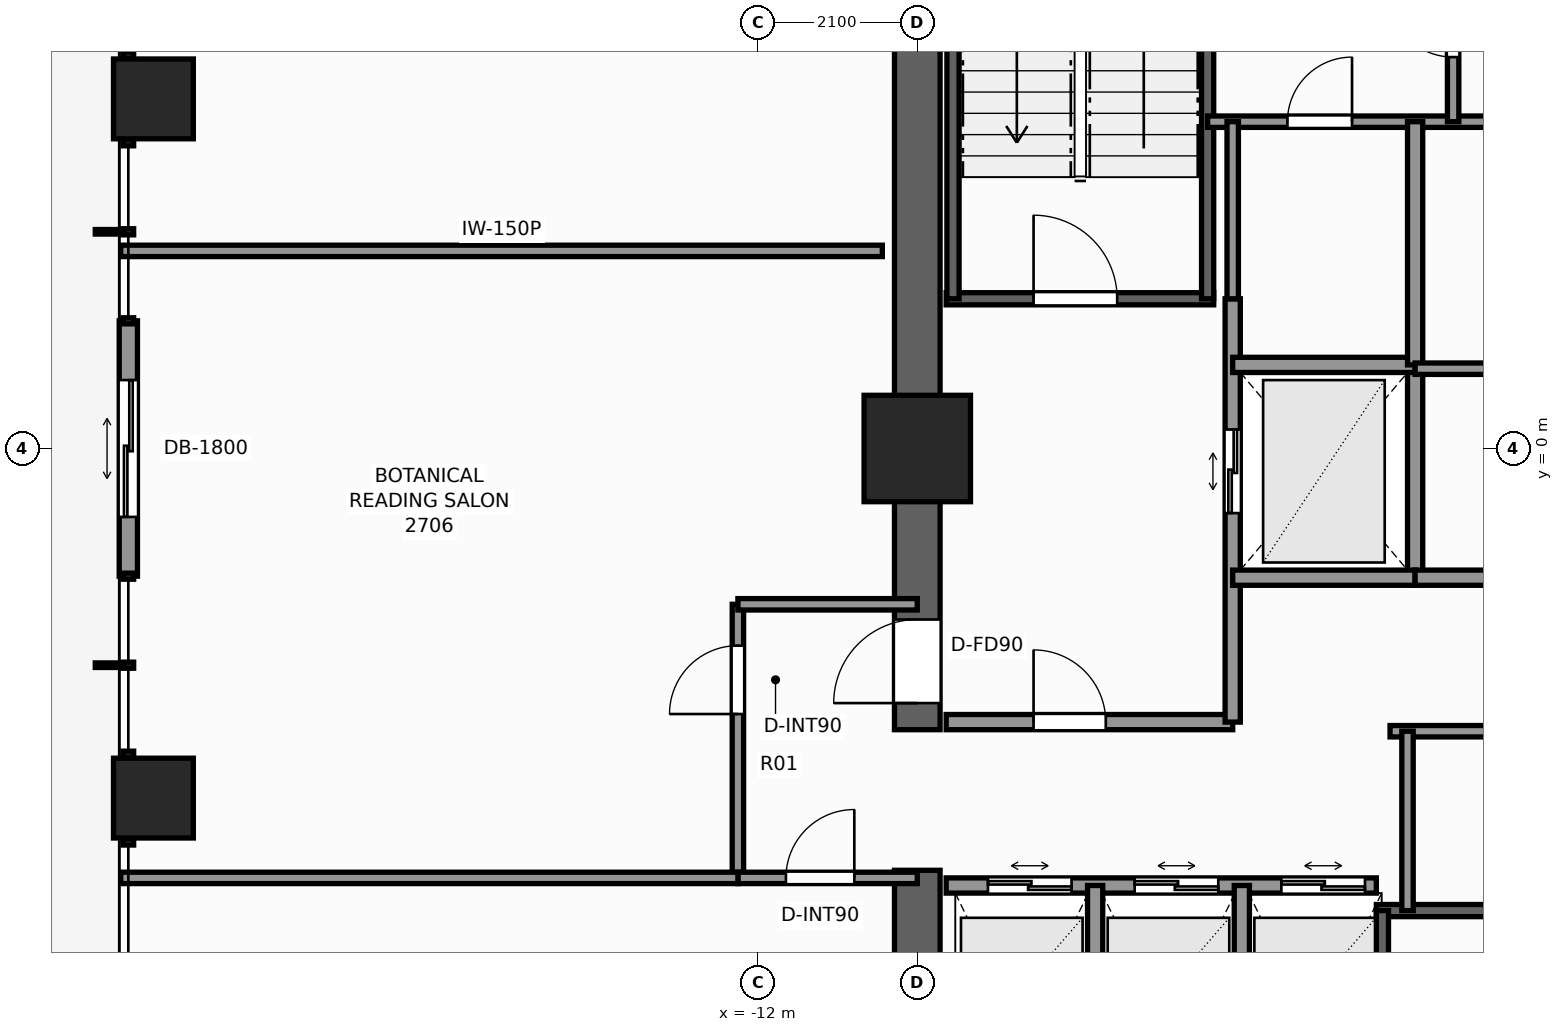
"""IFC4 building model, lengths in metres.
Left out: names, types, materials, properties, quantities, classifications, styles, units other than length and angle.
Written with IfcOpenShell. Run it as: python <this file> out.ifc"""

import sys

from ifc_helpers import new_model, si_unit, direction, frame, frame_2d, origin, origin_2d, place, context, subcontext, project, spatial, rectangle, extrude, element, fill, save


model = new_model("IFC4")
c1 = context("Model", 3, precision=1e-05, world=origin(), true_north=direction((0.0, 1.0)))
c2 = subcontext(c1, "Body", "Model", "MODEL_VIEW")
j1 = project(units=[si_unit("LENGTHUNIT", "METRE"), si_unit("PLANEANGLEUNIT", "RADIAN")], contexts=[c1])
p1 = place(None, origin())
s1 = spatial("IfcSite", under=j1, at=p1, CompositionType="ELEMENT")
p2 = place(p1, origin())
s2 = spatial("IfcBuilding", under=s1, at=p2, CompositionType="ELEMENT")
p3 = place(p2, frame((0.0, 0.0, 95.3)))
s3 = spatial("IfcBuildingStorey", under=s2, at=p3, CompositionType="ELEMENT", Elevation=95.3)
p4 = place(p3, frame((-9.9, -9.6, 0.0), z_axis=(0.0, 0.0, 1.0), x_axis=(0.0, 1.0, 0.0)))
e1 = element("IfcWall", 1, at=p4, inside=s3, PredefinedType="SHEAR", context=c2, shape_type="SweptSolid", body=[
    extrude(rectangle(XDim=4.05, YDim=0.6, at=frame_2d((2.025, 0.0))), origin(), (0.0, 0.0, 1.0), 3.3),
])
p5 = place(p3, frame((-9.9, -3.7, 0.0), z_axis=(0.0, 0.0, 1.0), x_axis=(0.0, 1.0, 0.0)))
e2 = element("IfcWall", 2, at=p5, inside=s3, PredefinedType="SHEAR", context=c2, shape_type="SweptSolid", body=[
    extrude(rectangle(XDim=13.3, YDim=0.6, at=frame_2d((6.65, 0.0))), origin(), (0.0, 0.0, 1.0), 3.3),
])
p6 = place(p5, frame((0.35, 0.0, 0.0)))
e3 = element("IfcOpeningElement", 3, at=p6, cuts=e2, PredefinedType="OPENING", context=c2, shape_type="SweptSolid", body=[
    extrude(rectangle(XDim=1.1, YDim=2.2, at=frame_2d((0.55, 1.1))), frame((0.0, 0.31, 0.0), z_axis=(0.0, -1.0, 0.0), x_axis=(1.0, 0.0, 0.0)), (0.0, 0.0, 1.0), 0.62),
])
p7 = place(p3, frame((-9.9, 0.0, 0.0), z_axis=(0.0, 0.0, 1.0), x_axis=(1.0, 0.0, 0.0)))
e4 = element("IfcColumn", 4, at=p7, inside=s3, PredefinedType="COLUMN", context=c2, shape_type="SweptSolid", body=[
    extrude(rectangle(XDim=1.4, YDim=1.4, at=origin_2d()), origin(), (0.0, 0.0, 1.0), 3.3),
])
for number, where, z_axis, x_axis in (
    (5, (-19.95, -4.6, 0.0), (0.0, 0.0, 1.0), (1.0, 0.0, 0.0)),
    (6, (-19.95, 4.6, 0.0), (0.0, 0.0, 1.0), (1.0, 0.0, 0.0)),
):
    element("IfcColumn", number, at=place(p3, frame(where, z_axis=z_axis, x_axis=x_axis)), inside=s3, PredefinedType="COLUMN", context=c2, shape_type="SweptSolid", body=[
        extrude(rectangle(XDim=1.05, YDim=1.05, at=origin_2d()), origin(), (0.0, 0.0, 1.0), 3.3),
    ])
p8 = place(p3, frame((-20.28, -1.68, 0.0), z_axis=(0.0, 0.0, 1.0), x_axis=(0.0, 1.0, 0.0)))
e7 = element("IfcWall", 7, at=p8, inside=s3, PredefinedType="STANDARD", context=c2, shape_type="SweptSolid", body=[
    extrude(rectangle(XDim=3.36, YDim=0.24, at=frame_2d((1.68, 0.0))), origin(), (0.0, 0.0, 1.0), 3.08),
])
p9 = place(p8, frame((0.78, 0.0, 0.0)))
e8 = element("IfcOpeningElement", 8, at=p9, cuts=e7, PredefinedType="OPENING", context=c2, shape_type="SweptSolid", body=[
    extrude(rectangle(XDim=1.8, YDim=2.2, at=frame_2d((0.9, 1.1))), frame((0.0, 0.13, 0.0), z_axis=(0.0, -1.0, 0.0), x_axis=(1.0, 0.0, 0.0)), (0.0, 0.0, 1.0), 0.26),
])
p10 = place(p3, frame((-9.52, 1.97, 0.0), z_axis=(0.0, 0.0, 1.0), x_axis=(1.0, 0.0, 0.0)))
e9 = element("IfcWall", 9, at=p10, inside=s3, PredefinedType="SHEAR", context=c2, shape_type="SweptSolid", body=[
    extrude(rectangle(XDim=3.52, YDim=0.16, at=frame_2d((1.76, 0.0))), origin(), (0.0, 0.0, 1.0), 3.3),
])
p11 = place(p10, frame((1.15, 0.0, 0.0)))
e10 = element("IfcOpeningElement", 10, at=p11, cuts=e9, PredefinedType="OPENING", context=c2, shape_type="SweptSolid", body=[
    extrude(rectangle(XDim=1.1, YDim=2.2, at=frame_2d((0.55, 1.1))), frame((0.0, 0.09, 0.0), z_axis=(0.0, -1.0, 0.0), x_axis=(1.0, 0.0, 0.0)), (0.0, 0.0, 1.0), 0.18),
])
for number, where, z_axis, x_axis in (
    (11, (-9.43, 1.97, 0.0), (0.0, 0.0, 1.0), (0.0, 1.0, 0.0)),
    (12, (-6.08, 1.97, 0.0), (0.0, 0.0, 1.0), (0.0, 1.0, 0.0)),
):
    element("IfcWall", number, at=place(p3, frame(where, z_axis=z_axis, x_axis=x_axis)), inside=s3, PredefinedType="SHEAR", context=c2, shape_type="SweptSolid", body=[
        extrude(rectangle(XDim=7.56, YDim=0.16, at=frame_2d((3.78, 0.0))), origin(), (0.0, 0.0, 1.0), 3.3),
    ])
p12 = place(p3, frame((-3.86, -6.08, 0.0), z_axis=(0.0, 0.0, 1.0), x_axis=(1.0, 0.0, 0.0)))
e13 = element("IfcWall", 13, at=p12, inside=s3, PredefinedType="SHEAR", context=c2, shape_type="SweptSolid", body=[
    extrude(rectangle(XDim=7.72, YDim=0.16, at=frame_2d((3.86, 0.0))), origin(), (0.0, 0.0, 1.0), 3.3),
])
p13 = place(p3, frame((-3.78, -9.43, 0.0), z_axis=(0.0, 0.0, 1.0), x_axis=(0.0, 1.0, 0.0)))
e14 = element("IfcWall", 14, at=p13, inside=s3, PredefinedType="SHEAR", context=c2, shape_type="SweptSolid", body=[
    extrude(rectangle(XDim=3.35, YDim=0.16, at=frame_2d((1.675, 0.0))), origin(), (0.0, 0.0, 1.0), 3.3),
])
p14 = place(p3, frame((-9.52, -3.6, 0.0), z_axis=(0.0, 0.0, 1.0), x_axis=(1.0, 0.0, 0.0)))
e15 = element("IfcWall", 15, at=p14, inside=s3, PredefinedType="SOLIDWALL", context=c2, shape_type="SweptSolid", body=[
    extrude(rectangle(XDim=3.77, YDim=0.2, at=frame_2d((1.885, 0.0))), origin(), (0.0, 0.0, 1.0), 3.08),
])
p15 = place(p14, frame((1.15, 0.0, 0.0)))
e16 = element("IfcOpeningElement", 16, at=p15, cuts=e15, PredefinedType="OPENING", context=c2, shape_type="SweptSolid", body=[
    extrude(rectangle(XDim=0.95, YDim=2.06, at=frame_2d((0.475, 1.03))), frame((0.0, 0.11, 0.0), z_axis=(0.0, -1.0, 0.0), x_axis=(1.0, 0.0, 0.0)), (0.0, 0.0, 1.0), 0.22),
])
p16 = place(p3, frame((-5.75, -3.6, 0.0), z_axis=(0.0, 0.0, 1.0), x_axis=(0.0, 1.0, 0.0)))
e17 = element("IfcWall", 17, at=p16, inside=s3, PredefinedType="SOLIDWALL", context=c2, shape_type="SweptSolid", body=[
    extrude(rectangle(XDim=5.57, YDim=0.2, at=frame_2d((2.785, 0.0))), origin(), (0.0, 0.0, 1.0), 3.08),
])
p17 = place(p16, frame((2.75, 0.0, 0.0)))
e18 = element("IfcOpeningElement", 18, at=p17, cuts=e17, PredefinedType="OPENING", context=c2, shape_type="SweptSolid", body=[
    extrude(rectangle(XDim=1.1, YDim=2.2, at=frame_2d((0.55, 1.1))), frame((0.0, 0.11, 0.0), z_axis=(0.0, -1.0, 0.0), x_axis=(1.0, 0.0, 0.0)), (0.0, 0.0, 1.0), 0.22),
])
p18 = place(p3, frame((-3.35, -1.7, 0.0), z_axis=(0.0, 0.0, 1.0), x_axis=(0.0, 1.0, 0.0)))
e19 = element("IfcWall", 19, at=p18, inside=s3, PredefinedType="SOLIDWALL", context=c2, shape_type="SweptSolid", body=[
    extrude(rectangle(XDim=2.8, YDim=0.2, at=frame_2d((1.4, 0.0))), origin(), (0.0, 0.0, 1.0), 3.08),
])
for number, where, z_axis, x_axis in (
    (20, (-5.75, -1.7, 0.0), (0.0, 0.0, 1.0), (1.0, 0.0, 0.0)),
    (21, (-5.75, 1.1, 0.0), (0.0, 0.0, 1.0), (1.0, 0.0, 0.0)),
):
    element("IfcWall", number, at=place(p3, frame(where, z_axis=z_axis, x_axis=x_axis)), inside=s3, PredefinedType="SOLIDWALL", context=c2, shape_type="SweptSolid", body=[
        extrude(rectangle(XDim=2.4, YDim=0.2, at=frame_2d((1.2, 0.0))), origin(), (0.0, 0.0, 1.0), 3.08),
    ])
p19 = place(p3, frame((-6.08, 4.3, 0.0), z_axis=(0.0, 0.0, 1.0), x_axis=(1.0, 0.0, 0.0)))
e22 = element("IfcWall", 22, at=p19, inside=s3, PredefinedType="PARTITIONING", context=c2, shape_type="SweptSolid", body=[
    extrude(rectangle(XDim=6.3, YDim=0.15, at=frame_2d((3.15, 0.0))), origin(), (0.0, 0.0, 1.0), 3.08),
])
p20 = place(p19, frame((1.05, 0.0, 0.0)))
e23 = element("IfcOpeningElement", 23, at=p20, cuts=e22, PredefinedType="OPENING", context=c2, shape_type="SweptSolid", body=[
    extrude(rectangle(XDim=0.85, YDim=2.03, at=frame_2d((0.425, 1.015))), frame((0.0, 0.085, 0.0), z_axis=(0.0, -1.0, 0.0), x_axis=(1.0, 0.0, 0.0)), (0.0, 0.0, 1.0), 0.17),
])
p21 = place(p3, frame((-2.85, 4.3, 0.0), z_axis=(0.0, 0.0, 1.0), x_axis=(0.0, 1.0, 0.0)))
e24 = element("IfcWall", 24, at=p21, inside=s3, PredefinedType="PARTITIONING", context=c2, shape_type="SweptSolid", body=[
    extrude(rectangle(XDim=5.22, YDim=0.15, at=frame_2d((2.61, 0.0))), origin(), (0.0, 0.0, 1.0), 3.08),
])
p22 = place(p21, frame((0.85, 0.0, 0.0)))
e25 = element("IfcOpeningElement", 25, at=p22, cuts=e24, PredefinedType="OPENING", context=c2, shape_type="SweptSolid", body=[
    extrude(rectangle(XDim=0.85, YDim=2.03, at=frame_2d((0.425, 1.015))), frame((0.0, 0.085, 0.0), z_axis=(0.0, -1.0, 0.0), x_axis=(1.0, 0.0, 0.0)), (0.0, 0.0, 1.0), 0.17),
])
p23 = place(p3, frame((-9.52, -5.75, 0.0), z_axis=(0.0, 0.0, 1.0), x_axis=(1.0, 0.0, 0.0)))
e26 = element("IfcWall", 26, at=p23, inside=s3, PredefinedType="SOLIDWALL", context=c2, shape_type="SweptSolid", body=[
    extrude(rectangle(XDim=5.66, YDim=0.2, at=frame_2d((2.83, 0.0))), origin(), (0.0, 0.0, 1.0), 3.08),
])
p24 = place(p23, frame((0.55, 0.0, 0.0)))
e27 = element("IfcOpeningElement", 27, at=p24, cuts=e26, PredefinedType="OPENING", context=c2, shape_type="SweptSolid", body=[
    extrude(rectangle(XDim=1.1, YDim=2.2, at=frame_2d((0.55, 1.1))), frame((0.0, 0.11, 0.0), z_axis=(0.0, -1.0, 0.0), x_axis=(1.0, 0.0, 0.0)), (0.0, 0.0, 1.0), 0.22),
])
p25 = place(p23, frame((2.48, 0.0, 0.0)))
e28 = element("IfcOpeningElement", 28, at=p25, cuts=e26, PredefinedType="OPENING", context=c2, shape_type="SweptSolid", body=[
    extrude(rectangle(XDim=1.1, YDim=2.2, at=frame_2d((0.55, 1.1))), frame((0.0, 0.11, 0.0), z_axis=(0.0, -1.0, 0.0), x_axis=(1.0, 0.0, 0.0)), (0.0, 0.0, 1.0), 0.22),
])
p26 = place(p23, frame((4.41, 0.0, 0.0)))
e29 = element("IfcOpeningElement", 29, at=p26, cuts=e26, PredefinedType="OPENING", context=c2, shape_type="SweptSolid", body=[
    extrude(rectangle(XDim=1.1, YDim=2.2, at=frame_2d((0.55, 1.1))), frame((0.0, 0.11, 0.0), z_axis=(0.0, -1.0, 0.0), x_axis=(1.0, 0.0, 0.0)), (0.0, 0.0, 1.0), 0.22),
])
for number, where, z_axis, x_axis in (
    (30, (-7.56, -9.52, 0.0), (0.0, 0.0, 1.0), (0.0, 1.0, 0.0)),
    (31, (-5.63, -9.52, 0.0), (0.0, 0.0, 1.0), (0.0, 1.0, 0.0)),
):
    element("IfcWall", number, at=place(p3, frame(where, z_axis=z_axis, x_axis=x_axis)), inside=s3, PredefinedType="SOLIDWALL", context=c2, shape_type="SweptSolid", body=[
        extrude(rectangle(XDim=3.77, YDim=0.2, at=frame_2d((1.885, 0.0))), origin(), (0.0, 0.0, 1.0), 3.08),
    ])
p27 = place(p3, frame((-3.35, -1.7, 0.0), z_axis=(0.0, 0.0, 1.0), x_axis=(1.0, 0.0, 0.0)))
e32 = element("IfcWall", 32, at=p27, inside=s3, PredefinedType="SOLIDWALL", context=c2, shape_type="SweptSolid", body=[
    extrude(rectangle(XDim=6.7, YDim=0.2, at=frame_2d((3.35, 0.0))), origin(), (0.0, 0.0, 1.0), 3.08),
])
p28 = place(p3, frame((-3.35, 1.1, 0.0), z_axis=(0.0, 0.0, 1.0), x_axis=(0.0, 1.0, 0.0)))
e33 = element("IfcWall", 33, at=p28, inside=s3, PredefinedType="SOLIDWALL", context=c2, shape_type="SweptSolid", body=[
    extrude(rectangle(XDim=3.2, YDim=0.2, at=frame_2d((1.6, 0.0))), origin(), (0.0, 0.0, 1.0), 3.08),
])
p29 = place(p3, frame((-3.35, 1.05, 0.0), z_axis=(0.0, 0.0, 1.0), x_axis=(1.0, 0.0, 0.0)))
e34 = element("IfcWall", 34, at=p29, inside=s3, PredefinedType="PARTITIONING", context=c2, shape_type="SweptSolid", body=[
    extrude(rectangle(XDim=6.7, YDim=0.15, at=frame_2d((3.35, 0.0))), origin(), (0.0, 0.0, 1.0), 3.08),
])
p30 = place(p29, frame((4.2, 0.0, 0.0)))
e35 = element("IfcOpeningElement", 35, at=p30, cuts=e34, PredefinedType="OPENING", context=c2, shape_type="SweptSolid", body=[
    extrude(rectangle(XDim=0.85, YDim=2.03, at=frame_2d((0.425, 1.015))), frame((0.0, 0.085, 0.0), z_axis=(0.0, -1.0, 0.0), x_axis=(1.0, 0.0, 0.0)), (0.0, 0.0, 1.0), 0.17),
])
p31 = place(p3, frame((-3.68, -3.72, 0.0), z_axis=(0.0, 0.0, 1.0), x_axis=(1.0, 0.0, 0.0)))
e36 = element("IfcWall", 36, at=p31, inside=s3, PredefinedType="PARTITIONING", context=c2, shape_type="SweptSolid", body=[
    extrude(rectangle(XDim=7.36, YDim=0.15, at=frame_2d((3.68, 0.0))), origin(), (0.0, 0.0, 1.0), 3.08),
])
p32 = place(p3, frame((-3.45, -6.08, 0.0), z_axis=(0.0, 0.0, 1.0), x_axis=(0.0, 1.0, 0.0)))
e37 = element("IfcWall", 37, at=p32, inside=s3, PredefinedType="PARTITIONING", context=c2, shape_type="SweptSolid", body=[
    extrude(rectangle(XDim=2.36, YDim=0.15, at=frame_2d((1.18, 0.0))), origin(), (0.0, 0.0, 1.0), 3.08),
])
p33 = place(p3, frame((-5.75, 1.97, 0.0), z_axis=(0.0, 0.0, 1.0), x_axis=(0.0, 1.0, 0.0)))
e38 = element("IfcWall", 38, at=p33, inside=s3, PredefinedType="PARTITIONING", context=c2, shape_type="SweptSolid", body=[
    extrude(rectangle(XDim=2.33, YDim=0.15, at=frame_2d((1.165, 0.0))), origin(), (0.0, 0.0, 1.0), 3.08),
])
p34 = place(p3, frame((-12.26, -5.65, 0.0), z_axis=(0.0, 0.0, 1.0), x_axis=(0.0, 1.0, 0.0)))
e39 = element("IfcWall", 39, at=p34, inside=s3, PredefinedType="PARTITIONING", context=c2, shape_type="SweptSolid", body=[
    extrude(rectangle(XDim=3.6, YDim=0.15, at=frame_2d((1.8, 0.0))), origin(), (0.0, 0.0, 1.0), 2.292),
])
p35 = place(p34, frame((2.156, 0.0, 0.0)))
e40 = element("IfcOpeningElement", 40, at=p35, cuts=e39, PredefinedType="OPENING", context=c2, shape_type="SweptSolid", body=[
    extrude(rectangle(XDim=0.9, YDim=2.06, at=frame_2d((0.45, 1.03))), frame((0.0, 0.085, 0.0), z_axis=(0.0, -1.0, 0.0), x_axis=(1.0, 0.0, 0.0)), (0.0, 0.0, 1.0), 0.17),
])
p36 = place(p3, frame((-12.26, -2.05, 0.0), z_axis=(0.0, 0.0, 1.0), x_axis=(1.0, 0.0, 0.0)))
e41 = element("IfcWall", 41, at=p36, inside=s3, PredefinedType="PARTITIONING", context=c2, shape_type="SweptSolid", body=[
    extrude(rectangle(XDim=2.36, YDim=0.15, at=frame_2d((1.18, 0.0))), origin(), (0.0, 0.0, 1.0), 3.08),
])
p37 = place(p3, frame((-12.26, -5.65, 0.0), z_axis=(0.0, 0.0, 1.0), x_axis=(1.0, 0.0, 0.0)))
e42 = element("IfcWall", 42, at=p37, inside=s3, PredefinedType="PARTITIONING", context=c2, shape_type="SweptSolid", body=[
    extrude(rectangle(XDim=2.36, YDim=0.15, at=frame_2d((1.18, 0.0))), origin(), (0.0, 0.0, 1.0), 3.08),
])
p38 = place(p37, frame((0.632, 0.0, 0.0)))
e43 = element("IfcOpeningElement", 43, at=p38, cuts=e42, PredefinedType="OPENING", context=c2, shape_type="SweptSolid", body=[
    extrude(rectangle(XDim=0.9, YDim=2.06, at=frame_2d((0.45, 1.03))), frame((0.0, 0.085, 0.0), z_axis=(0.0, -1.0, 0.0), x_axis=(1.0, 0.0, 0.0)), (0.0, 0.0, 1.0), 0.17),
])
p39 = place(p3, frame((-20.38, 2.6, 0.0), z_axis=(0.0, 0.0, 1.0), x_axis=(1.0, 0.0, 0.0)))
e44 = element("IfcWall", 44, at=p39, inside=s3, PredefinedType="PARTITIONING", context=c2, shape_type="SweptSolid", body=[
    extrude(rectangle(XDim=10.02, YDim=0.15, at=frame_2d((5.01, 0.0))), origin(), (0.0, 0.0, 1.0), 2.449),
])
p40 = place(p3, frame((-20.38, -5.65, 0.0), z_axis=(0.0, 0.0, 1.0), x_axis=(1.0, 0.0, 0.0)))
e45 = element("IfcWall", 45, at=p40, inside=s3, PredefinedType="PARTITIONING", context=c2, shape_type="SweptSolid", body=[
    extrude(rectangle(XDim=8.12, YDim=0.15, at=frame_2d((4.06, 0.0))), origin(), (0.0, 0.0, 1.0), 2.449),
])
p41 = place(p9, origin())
e46 = element("IfcDoor", 46, at=p41, inside=s3, OperationType="DOUBLE_DOOR_SLIDING", PredefinedType="DOOR", context=c2, shape_type="SweptSolid", body=[
    extrude(rectangle(XDim=1.8, YDim=2.2, at=frame_2d((0.9, 1.1))), frame((0.0, 0.025, 0.0), z_axis=(0.0, -1.0, 0.0), x_axis=(1.0, 0.0, 0.0)), (0.0, 0.0, 1.0), 0.05),
])
fill(e8, e46)
p42 = place(p11, origin())
e47 = element("IfcDoor", 47, at=p42, inside=s3, OperationType="SINGLE_SWING_LEFT", PredefinedType="DOOR", context=c2, shape_type="SweptSolid", body=[
    extrude(rectangle(XDim=1.1, YDim=2.2, at=frame_2d((0.55, 1.1))), frame((0.0, 0.025, 0.0), z_axis=(0.0, -1.0, 0.0), x_axis=(1.0, 0.0, 0.0)), (0.0, 0.0, 1.0), 0.05),
])
fill(e10, e47)
p43 = place(p6, origin())
e48 = element("IfcDoor", 48, at=p43, inside=s3, OperationType="SINGLE_SWING_LEFT", PredefinedType="DOOR", context=c2, shape_type="SweptSolid", body=[
    extrude(rectangle(XDim=1.1, YDim=2.2, at=frame_2d((0.55, 1.1))), frame((0.0, 0.025, 0.0), z_axis=(0.0, -1.0, 0.0), x_axis=(1.0, 0.0, 0.0)), (0.0, 0.0, 1.0), 0.05),
])
fill(e3, e48)
p44 = place(p17, origin())
e49 = element("IfcDoor", 49, at=p44, inside=s3, OperationType="DOUBLE_DOOR_SLIDING", PredefinedType="DOOR", context=c2, shape_type="SweptSolid", body=[
    extrude(rectangle(XDim=1.1, YDim=2.2, at=frame_2d((0.55, 1.1))), frame((0.0, 0.025, 0.0), z_axis=(0.0, -1.0, 0.0), x_axis=(1.0, 0.0, 0.0)), (0.0, 0.0, 1.0), 0.05),
])
fill(e18, e49)
p45 = place(p22, origin())
e50 = element("IfcDoor", 50, at=p45, inside=s3, OperationType="SINGLE_SWING_RIGHT", PredefinedType="DOOR", context=c2, shape_type="SweptSolid", body=[
    extrude(rectangle(XDim=0.85, YDim=2.03, at=frame_2d((0.425, 1.015))), frame((0.0, 0.025, 0.0), z_axis=(0.0, -1.0, 0.0), x_axis=(1.0, 0.0, 0.0)), (0.0, 0.0, 1.0), 0.05),
])
fill(e25, e50)
p46 = place(p24, origin())
e51 = element("IfcDoor", 51, at=p46, inside=s3, OperationType="DOUBLE_DOOR_SLIDING", PredefinedType="DOOR", context=c2, shape_type="SweptSolid", body=[
    extrude(rectangle(XDim=1.1, YDim=2.2, at=frame_2d((0.55, 1.1))), frame((0.0, 0.025, 0.0), z_axis=(0.0, -1.0, 0.0), x_axis=(1.0, 0.0, 0.0)), (0.0, 0.0, 1.0), 0.05),
])
fill(e27, e51)
p47 = place(p25, origin())
e52 = element("IfcDoor", 52, at=p47, inside=s3, OperationType="DOUBLE_DOOR_SLIDING", PredefinedType="DOOR", context=c2, shape_type="SweptSolid", body=[
    extrude(rectangle(XDim=1.1, YDim=2.2, at=frame_2d((0.55, 1.1))), frame((0.0, 0.025, 0.0), z_axis=(0.0, -1.0, 0.0), x_axis=(1.0, 0.0, 0.0)), (0.0, 0.0, 1.0), 0.05),
])
fill(e28, e52)
p48 = place(p26, origin())
e53 = element("IfcDoor", 53, at=p48, inside=s3, OperationType="DOUBLE_DOOR_SLIDING", PredefinedType="DOOR", context=c2, shape_type="SweptSolid", body=[
    extrude(rectangle(XDim=1.1, YDim=2.2, at=frame_2d((0.55, 1.1))), frame((0.0, 0.025, 0.0), z_axis=(0.0, -1.0, 0.0), x_axis=(1.0, 0.0, 0.0)), (0.0, 0.0, 1.0), 0.05),
])
fill(e29, e53)
p49 = place(p15, origin())
e54 = element("IfcDoor", 54, at=p49, inside=s3, OperationType="SINGLE_SWING_LEFT", PredefinedType="DOOR", context=c2, shape_type="SweptSolid", body=[
    extrude(rectangle(XDim=0.95, YDim=2.06, at=frame_2d((0.475, 1.03))), frame((0.0, 0.025, 0.0), z_axis=(0.0, -1.0, 0.0), x_axis=(1.0, 0.0, 0.0)), (0.0, 0.0, 1.0), 0.05),
])
fill(e16, e54)
p50 = place(p20, origin())
e55 = element("IfcDoor", 55, at=p50, inside=s3, OperationType="SINGLE_SWING_RIGHT", PredefinedType="DOOR", context=c2, shape_type="SweptSolid", body=[
    extrude(rectangle(XDim=0.85, YDim=2.03, at=frame_2d((0.425, 1.015))), frame((0.0, 0.025, 0.0), z_axis=(0.0, -1.0, 0.0), x_axis=(1.0, 0.0, 0.0)), (0.0, 0.0, 1.0), 0.05),
])
fill(e23, e55)
p51 = place(p35, origin())
e56 = element("IfcDoor", 56, at=p51, inside=s3, OperationType="SINGLE_SWING_LEFT", PredefinedType="DOOR", context=c2, shape_type="SweptSolid", body=[
    extrude(rectangle(XDim=0.9, YDim=2.06, at=frame_2d((0.45, 1.03))), frame((0.0, 0.025, 0.0), z_axis=(0.0, -1.0, 0.0), x_axis=(1.0, 0.0, 0.0)), (0.0, 0.0, 1.0), 0.05),
])
fill(e40, e56)
p52 = place(p38, origin())
e57 = element("IfcDoor", 57, at=p52, inside=s3, OperationType="SINGLE_SWING_RIGHT", PredefinedType="DOOR", context=c2, shape_type="SweptSolid", body=[
    extrude(rectangle(XDim=0.9, YDim=2.06, at=frame_2d((0.45, 1.03))), frame((0.0, 0.025, 0.0), z_axis=(0.0, -1.0, 0.0), x_axis=(1.0, 0.0, 0.0)), (0.0, 0.0, 1.0), 0.05),
])
fill(e43, e57)
save(model, sys.argv[1])
